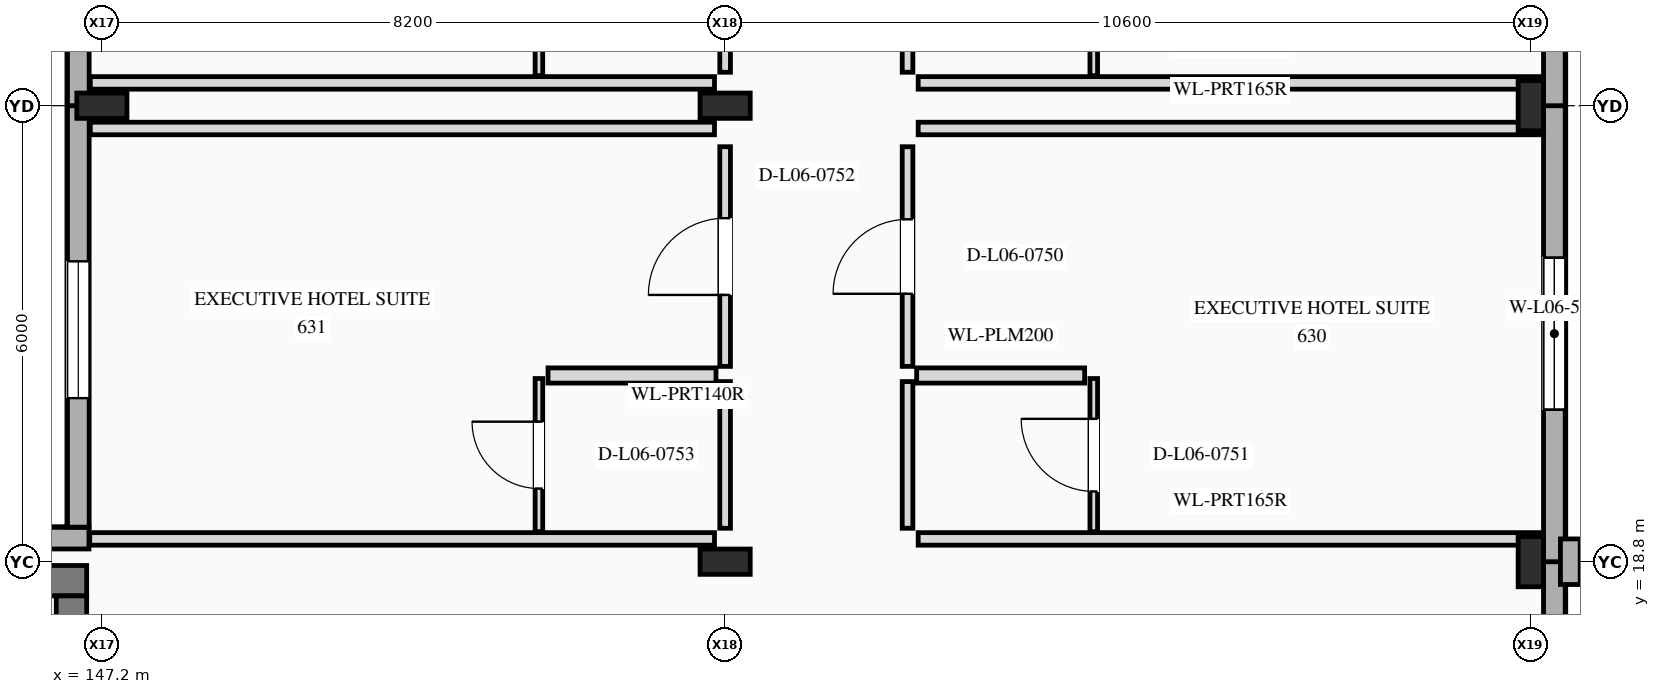
"""IFC4 building model, lengths in metres.
Left out: names, types, materials, properties, quantities, classifications, styles, units other than length and angle.
Written with IfcOpenShell. Run it as: python <this file> out.ifc"""

import sys

from ifc_helpers import new_model, si_unit, direction, frame, frame_2d, origin, origin_2d, place, context, subcontext, project, spatial, rectangle, i_section, extrude, element, fill, save


model = new_model("IFC4")
c1 = context("Model", 3, precision=1e-05, world=origin(), true_north=direction((0.0, 1.0)))
c2 = subcontext(c1, "Body", "Model", "MODEL_VIEW")
j1 = project(units=[si_unit("LENGTHUNIT", "METRE"), si_unit("PLANEANGLEUNIT", "RADIAN")], contexts=[c1])
p1 = place(None, origin())
s1 = spatial("IfcSite", under=j1, at=p1, CompositionType="ELEMENT")
p2 = place(p1, origin())
s2 = spatial("IfcBuilding", under=s1, at=p2, CompositionType="ELEMENT")
p3 = place(p2, frame((0.0, 0.0, 27.0)))
s3 = spatial("IfcBuildingStorey", under=s2, at=p3, CompositionType="ELEMENT", Elevation=27.0)
for number, where, z_axis, x_axis in (
    (1, (147.2, 24.8, 0.0), (0.0, 0.0, 1.0), (0.0, 1.0, 0.0)),
    (2, (155.4, 18.8, 0.0), (0.0, 0.0, 1.0), (0.0, 1.0, 0.0)),
    (3, (155.4, 24.8, 0.0), (0.0, 0.0, 1.0), (0.0, 1.0, 0.0)),
    (4, (166.0, 18.8, 0.0), (0.0, 0.0, 1.0), (1.0, 0.0, 0.0)),
    (5, (166.0, 24.8, 0.0), (0.0, 0.0, 1.0), (1.0, 0.0, 0.0)),
):
    element("IfcColumn", number, at=place(p3, frame(where, z_axis=z_axis, x_axis=x_axis)), inside=s3, PredefinedType="COLUMN", context=c2, shape_type="SweptSolid", body=[
        extrude(i_section(OverallWidth=0.333, OverallDepth=0.66, WebThickness=0.024, FlangeThickness=0.044, at=origin_2d()), origin(), (0.0, 0.0, 1.0), 3.6),
    ])
p4 = place(p3, frame((166.31, 8.2, 0.0), z_axis=(0.0, 0.0, 1.0), x_axis=(0.0, 1.0, 0.0)))
e6 = element("IfcWall", 6, at=p4, inside=s3, PredefinedType="STANDARD", context=c2, shape_type="SweptSolid", body=[
    extrude(rectangle(XDim=10.6, YDim=0.285, at=frame_2d((5.3, 0.0))), origin(), (0.0, 0.0, 1.0), 3.6),
])
p5 = place(p4, frame((4.55, 0.0, 0.88)))
e7 = element("IfcOpeningElement", 7, at=p5, cuts=e6, PredefinedType="OPENING", context=c2, shape_type="SweptSolid", body=[
    extrude(rectangle(XDim=1.5, YDim=1.7, at=frame_2d((0.75, 0.85))), frame((0.0, 0.152, 0.0), z_axis=(0.0, -1.0, 0.0), x_axis=(1.0, 0.0, 0.0)), (0.0, 0.0, 1.0), 0.305),
])
p6 = place(p3, frame((166.31, 18.8, 0.0), z_axis=(0.0, 0.0, 1.0), x_axis=(0.0, 1.0, 0.0)))
e8 = element("IfcWall", 8, at=p6, inside=s3, PredefinedType="STANDARD", context=c2, shape_type="SweptSolid", body=[
    extrude(rectangle(XDim=6.0, YDim=0.285, at=frame_2d((3.0, 0.0))), origin(), (0.0, 0.0, 1.0), 3.6),
])
p7 = place(p6, frame((2.0, 0.0, 0.85)))
e9 = element("IfcOpeningElement", 9, at=p7, cuts=e8, PredefinedType="OPENING", context=c2, shape_type="SweptSolid", body=[
    extrude(rectangle(XDim=2.0, YDim=1.65, at=frame_2d((1.0, 0.825))), frame((0.0, 0.152, 0.0), z_axis=(0.0, -1.0, 0.0), x_axis=(1.0, 0.0, 0.0)), (0.0, 0.0, 1.0), 0.305),
])
p8 = place(p3, frame((166.52, 18.5, 0.0), z_axis=(0.0, 0.0, 1.0), x_axis=(0.0, 1.0, 0.0)))
e10 = element("IfcWall", 10, at=p8, inside=s3, PredefinedType="ELEMENTEDWALL", context=c2, shape_type="SweptSolid", body=[
    extrude(rectangle(XDim=0.6, YDim=0.26, at=frame_2d((0.3, 0.0))), origin(), (0.0, 0.0, 1.0), 3.6),
])
p9 = place(p3, frame((166.31, 24.8, 0.0), z_axis=(0.0, 0.0, 1.0), x_axis=(0.0, 1.0, 0.0)))
e11 = element("IfcWall", 11, at=p9, inside=s3, PredefinedType="STANDARD", context=c2, shape_type="SweptSolid", body=[
    extrude(rectangle(XDim=1.34, YDim=0.285, at=frame_2d((0.67, 0.0))), origin(), (0.0, 0.0, 1.0), 3.6),
])
p10 = place(p3, frame((147.03, 19.11, 0.0), z_axis=(0.0, 0.0, 1.0), x_axis=(-1.0, 0.0, 0.0)))
e12 = element("IfcWall", 12, at=p10, inside=s3, PredefinedType="STANDARD", context=c2, shape_type="SweptSolid", body=[
    extrude(rectangle(XDim=11.03, YDim=0.285, at=frame_2d((5.515, 0.0))), origin(), (0.0, 0.0, 1.0), 3.6),
])
p11 = place(p3, frame((146.89, 19.254, 0.0), z_axis=(0.0, 0.0, 1.0), x_axis=(0.0, 1.0, 0.0)))
e13 = element("IfcWall", 13, at=p11, inside=s3, PredefinedType="STANDARD", context=c2, shape_type="SweptSolid", body=[
    extrude(rectangle(XDim=5.546, YDim=0.285, at=frame_2d((2.773, 0.0))), origin(), (0.0, 0.0, 1.0), 3.6),
])
p12 = place(p11, frame((1.698, 0.0, 0.85)))
e14 = element("IfcOpeningElement", 14, at=p12, cuts=e13, PredefinedType="OPENING", context=c2, shape_type="SweptSolid", body=[
    extrude(rectangle(XDim=1.8, YDim=1.8, at=frame_2d((0.9, 0.9))), frame((0.0, 0.152, 0.0), z_axis=(0.0, -1.0, 0.0), x_axis=(1.0, 0.0, 0.0)), (0.0, 0.0, 1.0), 0.305),
])
p13 = place(p3, frame((146.89, 24.8, 0.0), z_axis=(0.0, 0.0, 1.0), x_axis=(0.0, 1.0, 0.0)))
e15 = element("IfcWall", 15, at=p13, inside=s3, PredefinedType="STANDARD", context=c2, shape_type="SweptSolid", body=[
    extrude(rectangle(XDim=8.4, YDim=0.285, at=frame_2d((4.2, 0.0))), origin(), (0.0, 0.0, 1.0), 3.6),
])
p14 = place(p13, frame((3.225, 0.0, 0.85)))
e16 = element("IfcOpeningElement", 16, at=p14, cuts=e15, PredefinedType="OPENING", context=c2, shape_type="SweptSolid", body=[
    extrude(rectangle(XDim=1.95, YDim=1.85, at=frame_2d((0.975, 0.925))), frame((0.0, 0.152, 0.0), z_axis=(0.0, -1.0, 0.0), x_axis=(1.0, 0.0, 0.0)), (0.0, 0.0, 1.0), 0.305),
])
p15 = place(p3, frame((147.0, 18.55, 0.0), z_axis=(0.0, 0.0, 1.0), x_axis=(-1.0, 0.0, 0.0)))
e17 = element("IfcWall", 17, at=p15, inside=s3, PredefinedType="SHEAR", context=c2, shape_type="SweptSolid", body=[
    extrude(rectangle(XDim=10.6, YDim=0.4, at=frame_2d((5.3, 0.0))), origin(), (0.0, 0.0, 1.0), 3.6),
])
p16 = place(p3, frame((146.8, 11.0, 0.0), z_axis=(0.0, 0.0, 1.0), x_axis=(0.0, 1.0, 0.0)))
e18 = element("IfcWall", 18, at=p16, inside=s3, PredefinedType="SHEAR", context=c2, shape_type="SweptSolid", body=[
    extrude(rectangle(XDim=7.35, YDim=0.4, at=frame_2d((3.675, 0.0))), origin(), (0.0, 0.0, 1.0), 3.6),
])
p17 = place(p16, frame((5.0, 0.0, 0.0)))
e19 = element("IfcOpeningElement", 19, at=p17, cuts=e18, PredefinedType="OPENING", context=c2, shape_type="SweptSolid", body=[
    extrude(rectangle(XDim=0.95, YDim=2.2, at=frame_2d((0.475, 1.1))), frame((0.0, 0.21, 0.0), z_axis=(0.0, -1.0, 0.0), x_axis=(1.0, 0.0, 0.0)), (0.0, 0.0, 1.0), 0.42),
])
p18 = place(p16, frame((0.175, 0.0, 0.0)))
e20 = element("IfcOpeningElement", 20, at=p18, cuts=e18, PredefinedType="OPENING", context=c2, shape_type="SweptSolid", body=[
    extrude(rectangle(XDim=1.15, YDim=2.25, at=frame_2d((0.575, 1.125))), frame((0.0, 0.21, 0.0), z_axis=(0.0, -1.0, 0.0), x_axis=(1.0, 0.0, 0.0)), (0.0, 0.0, 1.0), 0.42),
])
p19 = place(p16, frame((1.875, 0.0, 0.0)))
e21 = element("IfcOpeningElement", 21, at=p19, cuts=e18, PredefinedType="OPENING", context=c2, shape_type="SweptSolid", body=[
    extrude(rectangle(XDim=1.15, YDim=2.25, at=frame_2d((0.575, 1.125))), frame((0.0, 0.21, 0.0), z_axis=(0.0, -1.0, 0.0), x_axis=(1.0, 0.0, 0.0)), (0.0, 0.0, 1.0), 0.42),
])
p20 = place(p3, frame((157.8, 19.24, 0.0), z_axis=(0.0, 0.0, 1.0), x_axis=(0.0, 1.0, 0.0)))
e22 = element("IfcWall", 22, at=p20, inside=s3, PredefinedType="PARTITIONING", context=c2, shape_type="SweptSolid", body=[
    extrude(rectangle(XDim=1.93, YDim=0.14, at=frame_2d((0.965, 0.0))), origin(), (0.0, 0.0, 1.0), 2.848),
])
p21 = place(p3, frame((157.8, 21.37, 0.0), z_axis=(0.0, 0.0, 1.0), x_axis=(0.0, 1.0, 0.0)))
e23 = element("IfcWall", 23, at=p21, inside=s3, PredefinedType="PARTITIONING", context=c2, shape_type="SweptSolid", body=[
    extrude(rectangle(XDim=2.89, YDim=0.14, at=frame_2d((1.445, 0.0))), origin(), (0.0, 0.0, 1.0), 2.848),
])
p22 = place(p21, frame((0.955, 0.0, 0.0)))
e24 = element("IfcOpeningElement", 24, at=p22, cuts=e23, PredefinedType="OPENING", context=c2, shape_type="SweptSolid", body=[
    extrude(rectangle(XDim=0.98, YDim=2.2, at=frame_2d((0.49, 1.1))), frame((0.0, 0.08, 0.0), z_axis=(0.0, -1.0, 0.0), x_axis=(1.0, 0.0, 0.0)), (0.0, 0.0, 1.0), 0.16),
])
for number, where, z_axis, x_axis in (
    (25, (157.94, 19.1, 0.0), (0.0, 0.0, 1.0), (1.0, 0.0, 0.0)),
    (26, (157.94, 24.5, 0.0), (0.0, 0.0, 1.0), (1.0, 0.0, 0.0)),
):
    element("IfcWall", number, at=place(p3, frame(where, z_axis=z_axis, x_axis=x_axis)), inside=s3, PredefinedType="PARTITIONING", context=c2, shape_type="SweptSolid", body=[
        extrude(rectangle(XDim=8.213, YDim=0.165, at=frame_2d((4.106, 0.0))), origin(), (0.0, 0.0, 1.0), 2.68),
    ])
p23 = place(p3, frame((157.92, 21.25, 0.0), z_axis=(0.0, 0.0, 1.0), x_axis=(1.0, 0.0, 0.0)))
e27 = element("IfcWall", 27, at=p23, inside=s3, PredefinedType="PLUMBINGWALL", context=c2, shape_type="SweptSolid", body=[
    extrude(rectangle(XDim=2.21, YDim=0.2, at=frame_2d((1.105, 0.0))), origin(), (0.0, 0.0, 1.0), 3.29),
])
p24 = place(p3, frame((160.25, 19.195, 0.0), z_axis=(0.0, 0.0, 1.0), x_axis=(0.0, 1.0, 0.0)))
e28 = element("IfcWall", 28, at=p24, inside=s3, PredefinedType="PARTITIONING", context=c2, shape_type="SweptSolid", body=[
    extrude(rectangle(XDim=2.015, YDim=0.1, at=frame_2d((1.008, 0.0))), origin(), (0.0, 0.0, 1.0), 2.848),
])
p25 = place(p24, frame((0.53, 0.0, 0.0)))
e29 = element("IfcOpeningElement", 29, at=p25, cuts=e28, PredefinedType="OPENING", context=c2, shape_type="SweptSolid", body=[
    extrude(rectangle(XDim=0.955, YDim=2.14, at=frame_2d((0.478, 1.07))), frame((0.0, 0.06, 0.0), z_axis=(0.0, -1.0, 0.0), x_axis=(1.0, 0.0, 0.0)), (0.0, 0.0, 1.0), 0.12),
])
p26 = place(p3, frame((155.4, 19.24, 0.0), z_axis=(0.0, 0.0, 1.0), x_axis=(0.0, 1.0, 0.0)))
e30 = element("IfcWall", 30, at=p26, inside=s3, PredefinedType="PARTITIONING", context=c2, shape_type="SweptSolid", body=[
    extrude(rectangle(XDim=1.93, YDim=0.14, at=frame_2d((0.965, 0.0))), origin(), (0.0, 0.0, 1.0), 2.764),
])
p27 = place(p3, frame((155.4, 21.37, 0.0), z_axis=(0.0, 0.0, 1.0), x_axis=(0.0, 1.0, 0.0)))
e31 = element("IfcWall", 31, at=p27, inside=s3, PredefinedType="PARTITIONING", context=c2, shape_type="SweptSolid", body=[
    extrude(rectangle(XDim=2.89, YDim=0.14, at=frame_2d((1.445, 0.0))), origin(), (0.0, 0.0, 1.0), 2.764),
])
p28 = place(p27, frame((0.94, 0.0, 0.0)))
e32 = element("IfcOpeningElement", 32, at=p28, cuts=e31, PredefinedType="OPENING", context=c2, shape_type="SweptSolid", body=[
    extrude(rectangle(XDim=1.01, YDim=2.2, at=frame_2d((0.505, 1.1))), frame((0.0, 0.08, 0.0), z_axis=(0.0, -1.0, 0.0), x_axis=(1.0, 0.0, 0.0)), (0.0, 0.0, 1.0), 0.16),
])
p29 = place(p3, frame((147.04, 19.1, 0.0), z_axis=(0.0, 0.0, 1.0), x_axis=(1.0, 0.0, 0.0)))
e33 = element("IfcWall", 33, at=p29, inside=s3, PredefinedType="PARTITIONING", context=c2, shape_type="SweptSolid", body=[
    extrude(rectangle(XDim=8.22, YDim=0.165, at=frame_2d((4.11, 0.0))), origin(), (0.0, 0.0, 1.0), 3.29),
])
p30 = place(p3, frame((147.048, 24.5, 0.0), z_axis=(0.0, 0.0, 1.0), x_axis=(1.0, 0.0, 0.0)))
e34 = element("IfcWall", 34, at=p30, inside=s3, PredefinedType="PARTITIONING", context=c2, shape_type="SweptSolid", body=[
    extrude(rectangle(XDim=8.212, YDim=0.165, at=frame_2d((4.106, 0.0))), origin(), (0.0, 0.0, 1.0), 2.703),
])
p31 = place(p3, frame((153.07, 21.25, 0.0), z_axis=(0.0, 0.0, 1.0), x_axis=(1.0, 0.0, 0.0)))
e35 = element("IfcWall", 35, at=p31, inside=s3, PredefinedType="PLUMBINGWALL", context=c2, shape_type="SweptSolid", body=[
    extrude(rectangle(XDim=2.21, YDim=0.2, at=frame_2d((1.105, 0.0))), origin(), (0.0, 0.0, 1.0), 3.29),
])
p32 = place(p3, frame((152.95, 19.195, 0.0), z_axis=(0.0, 0.0, 1.0), x_axis=(0.0, 1.0, 0.0)))
e36 = element("IfcWall", 36, at=p32, inside=s3, PredefinedType="PARTITIONING", context=c2, shape_type="SweptSolid", body=[
    extrude(rectangle(XDim=2.015, YDim=0.1, at=frame_2d((1.008, 0.0))), origin(), (0.0, 0.0, 1.0), 3.29),
])
p33 = place(p32, frame((0.568, 0.0, 0.0)))
e37 = element("IfcOpeningElement", 37, at=p33, cuts=e36, PredefinedType="OPENING", context=c2, shape_type="SweptSolid", body=[
    extrude(rectangle(XDim=0.88, YDim=2.18, at=frame_2d((0.44, 1.09))), frame((0.0, 0.06, 0.0), z_axis=(0.0, -1.0, 0.0), x_axis=(1.0, 0.0, 0.0)), (0.0, 0.0, 1.0), 0.12),
])
p34 = place(p3, frame((157.8, 25.24, 0.0), z_axis=(0.0, 0.0, 1.0), x_axis=(0.0, 1.0, 0.0)))
e38 = element("IfcWall", 38, at=p34, inside=s3, PredefinedType="PARTITIONING", context=c2, shape_type="SweptSolid", body=[
    extrude(rectangle(XDim=1.93, YDim=0.14, at=frame_2d((0.965, 0.0))), origin(), (0.0, 0.0, 1.0), 2.848),
])
p35 = place(p3, frame((157.94, 25.1, 0.0), z_axis=(0.0, 0.0, 1.0), x_axis=(1.0, 0.0, 0.0)))
e39 = element("IfcWall", 39, at=p35, inside=s3, PredefinedType="PARTITIONING", context=c2, shape_type="SweptSolid", body=[
    extrude(rectangle(XDim=8.213, YDim=0.165, at=frame_2d((4.106, 0.0))), origin(), (0.0, 0.0, 1.0), 2.68),
])
p36 = place(p3, frame((160.25, 25.195, 0.0), z_axis=(0.0, 0.0, 1.0), x_axis=(0.0, 1.0, 0.0)))
e40 = element("IfcWall", 40, at=p36, inside=s3, PredefinedType="PARTITIONING", context=c2, shape_type="SweptSolid", body=[
    extrude(rectangle(XDim=2.015, YDim=0.1, at=frame_2d((1.008, 0.0))), origin(), (0.0, 0.0, 1.0), 2.848),
])
p37 = place(p36, frame((0.555, 0.0, 0.0)))
e41 = element("IfcOpeningElement", 41, at=p37, cuts=e40, PredefinedType="OPENING", context=c2, shape_type="SweptSolid", body=[
    extrude(rectangle(XDim=0.905, YDim=2.18, at=frame_2d((0.453, 1.09))), frame((0.0, 0.06, 0.0), z_axis=(0.0, -1.0, 0.0), x_axis=(1.0, 0.0, 0.0)), (0.0, 0.0, 1.0), 0.12),
])
p38 = place(p3, frame((155.4, 25.24, 0.0), z_axis=(0.0, 0.0, 1.0), x_axis=(0.0, 1.0, 0.0)))
e42 = element("IfcWall", 42, at=p38, inside=s3, PredefinedType="PARTITIONING", context=c2, shape_type="SweptSolid", body=[
    extrude(rectangle(XDim=1.93, YDim=0.14, at=frame_2d((0.965, 0.0))), origin(), (0.0, 0.0, 1.0), 2.764),
])
p39 = place(p3, frame((147.048, 25.1, 0.0), z_axis=(0.0, 0.0, 1.0), x_axis=(1.0, 0.0, 0.0)))
e43 = element("IfcWall", 43, at=p39, inside=s3, PredefinedType="PARTITIONING", context=c2, shape_type="SweptSolid", body=[
    extrude(rectangle(XDim=8.212, YDim=0.165, at=frame_2d((4.106, 0.0))), origin(), (0.0, 0.0, 1.0), 2.703),
])
p40 = place(p3, frame((152.95, 25.195, 0.0), z_axis=(0.0, 0.0, 1.0), x_axis=(0.0, 1.0, 0.0)))
e44 = element("IfcWall", 44, at=p40, inside=s3, PredefinedType="PARTITIONING", context=c2, shape_type="SweptSolid", body=[
    extrude(rectangle(XDim=2.015, YDim=0.1, at=frame_2d((1.008, 0.0))), origin(), (0.0, 0.0, 1.0), 2.898),
])
p41 = place(p40, frame((0.543, 0.0, 0.0)))
e45 = element("IfcOpeningElement", 45, at=p41, cuts=e44, PredefinedType="OPENING", context=c2, shape_type="SweptSolid", body=[
    extrude(rectangle(XDim=0.93, YDim=2.22, at=frame_2d((0.465, 1.11))), frame((0.0, 0.06, 0.0), z_axis=(0.0, -1.0, 0.0), x_axis=(1.0, 0.0, 0.0)), (0.0, 0.0, 1.0), 0.12),
])
p42 = place(p7, origin())
e46 = element("IfcWindow", 46, at=p42, inside=s3, PartitioningType="SINGLE_PANEL", PredefinedType="WINDOW", context=c2, shape_type="SweptSolid", body=[
    extrude(rectangle(XDim=2.0, YDim=1.65, at=frame_2d((1.0, 0.825))), frame((0.0, 0.03, 0.0), z_axis=(0.0, -1.0, 0.0), x_axis=(1.0, 0.0, 0.0)), (0.0, 0.0, 1.0), 0.06),
])
fill(e9, e46)
p43 = place(p12, origin())
e47 = element("IfcWindow", 47, at=p43, inside=s3, PartitioningType="SINGLE_PANEL", PredefinedType="WINDOW", context=c2, shape_type="SweptSolid", body=[
    extrude(rectangle(XDim=1.8, YDim=1.8, at=frame_2d((0.9, 0.9))), frame((0.0, 0.03, 0.0), z_axis=(0.0, -1.0, 0.0), x_axis=(1.0, 0.0, 0.0)), (0.0, 0.0, 1.0), 0.06),
])
fill(e14, e47)
p44 = place(p22, origin())
e48 = element("IfcDoor", 48, at=p44, inside=s3, OperationType="SINGLE_SWING_LEFT", PredefinedType="DOOR", context=c2, shape_type="SweptSolid", body=[
    extrude(rectangle(XDim=0.98, YDim=2.2, at=frame_2d((0.49, 1.1))), frame((0.0, 0.025, 0.0), z_axis=(0.0, -1.0, 0.0), x_axis=(1.0, 0.0, 0.0)), (0.0, 0.0, 1.0), 0.05),
])
fill(e24, e48)
p45 = place(p25, origin())
e49 = element("IfcDoor", 49, at=p45, inside=s3, OperationType="SINGLE_SWING_RIGHT", PredefinedType="DOOR", context=c2, shape_type="SweptSolid", body=[
    extrude(rectangle(XDim=0.955, YDim=2.14, at=frame_2d((0.478, 1.07))), frame((0.0, 0.025, 0.0), z_axis=(0.0, -1.0, 0.0), x_axis=(1.0, 0.0, 0.0)), (0.0, 0.0, 1.0), 0.05),
])
fill(e29, e49)
p46 = place(p28, origin())
e50 = element("IfcDoor", 50, at=p46, inside=s3, OperationType="SINGLE_SWING_LEFT", PredefinedType="DOOR", context=c2, shape_type="SweptSolid", body=[
    extrude(rectangle(XDim=1.01, YDim=2.2, at=frame_2d((0.505, 1.1))), frame((0.0, 0.025, 0.0), z_axis=(0.0, -1.0, 0.0), x_axis=(1.0, 0.0, 0.0)), (0.0, 0.0, 1.0), 0.05),
])
fill(e32, e50)
p47 = place(p33, origin())
e51 = element("IfcDoor", 51, at=p47, inside=s3, OperationType="SINGLE_SWING_RIGHT", PredefinedType="DOOR", context=c2, shape_type="SweptSolid", body=[
    extrude(rectangle(XDim=0.88, YDim=2.18, at=frame_2d((0.44, 1.09))), frame((0.0, 0.025, 0.0), z_axis=(0.0, -1.0, 0.0), x_axis=(1.0, 0.0, 0.0)), (0.0, 0.0, 1.0), 0.05),
])
fill(e37, e51)
save(model, sys.argv[1])
